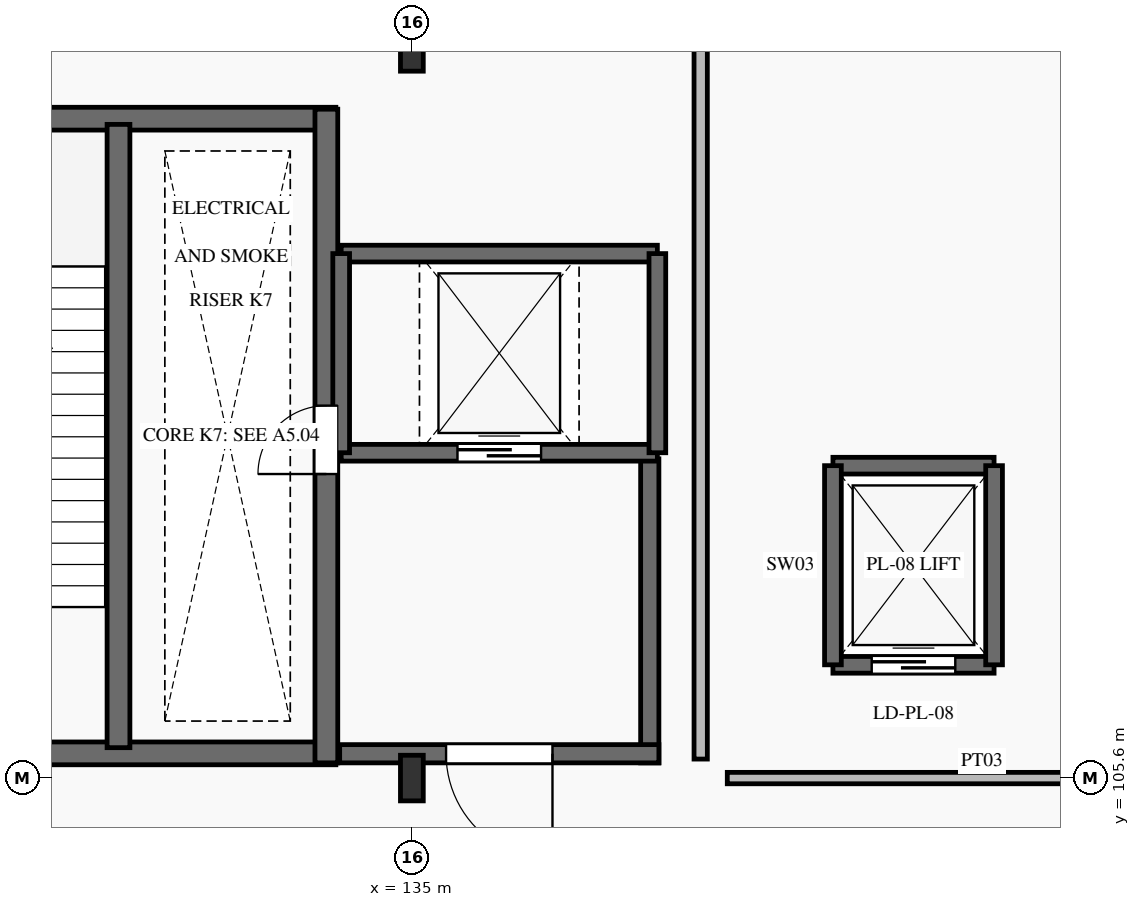
"""IFC4 building model, lengths in metres.
Left out: names, types, materials, properties, quantities, classifications, styles, units other than length and angle.
Written with IfcOpenShell. Run it as: python <this file> out.ifc"""

import sys

from ifc_helpers import new_model, si_unit, direction, frame, frame_2d, origin, origin_2d, place, context, subcontext, project, spatial, rectangle, i_section, extrude, element, fill, save


model = new_model("IFC4")
c1 = context("Model", 3, precision=1e-05, world=origin(), true_north=direction((0.0, 1.0)))
c2 = subcontext(c1, "Body", "Model", "MODEL_VIEW")
j1 = project(units=[si_unit("LENGTHUNIT", "METRE"), si_unit("PLANEANGLEUNIT", "RADIAN")], contexts=[c1])
p1 = place(None, origin())
s1 = spatial("IfcSite", under=j1, at=p1, CompositionType="ELEMENT")
p2 = place(p1, origin())
s2 = spatial("IfcBuilding", under=s1, at=p2, CompositionType="ELEMENT")
p3 = place(p2, origin())
s3 = spatial("IfcBuildingStorey", under=s2, at=p3, CompositionType="ELEMENT", Elevation=0.0)
for number, where, z_axis, x_axis in (
    (1, (135.0, 105.6, 0.0), (0.0, 0.0, 1.0), (1.0, 0.0, 0.0)),
    (2, (135.0, 115.2, 0.0), (0.0, 0.0, 1.0), (1.0, 0.0, 0.0)),
):
    element("IfcColumn", number, at=place(p3, frame(where, z_axis=z_axis, x_axis=x_axis)), inside=s3, PredefinedType="COLUMN", context=c2, shape_type="SweptSolid", body=[
        extrude(i_section(OverallWidth=0.3, OverallDepth=0.6, WebThickness=0.015, FlangeThickness=0.03, FilletRadius=0.027, at=origin_2d()), origin(), (0.0, 0.0, 1.0), 6.0),
    ])
p4 = place(p3, frame((127.0, 105.925, 0.0), z_axis=(0.0, 0.0, 1.0), x_axis=(1.0, 0.0, 0.0)))
e3 = element("IfcWall", 3, at=p4, inside=s3, PredefinedType="SHEAR", context=c2, shape_type="SweptSolid", body=[
    extrude(rectangle(XDim=7.0, YDim=0.3, at=frame_2d((3.5, 0.0))), origin(), (0.0, 0.0, 1.0), 6.0),
])
p5 = place(p4, frame((1.25, 0.0, 0.0)))
e4 = element("IfcOpeningElement", 4, at=p5, cuts=e3, PredefinedType="OPENING", context=c2, shape_type="SweptSolid", body=[
    extrude(rectangle(XDim=1.35, YDim=2.2, at=frame_2d((0.675, 1.1))), frame((0.0, 0.165, 0.0), z_axis=(0.0, -1.0, 0.0), x_axis=(1.0, 0.0, 0.0)), (0.0, 0.0, 1.0), 0.33),
])
p6 = place(p3, frame((127.0, 114.275, 0.0), z_axis=(0.0, 0.0, 1.0), x_axis=(1.0, 0.0, 0.0)))
e5 = element("IfcWall", 5, at=p6, inside=s3, PredefinedType="SHEAR", context=c2, shape_type="SweptSolid", body=[
    extrude(rectangle(XDim=7.0, YDim=0.3, at=frame_2d((3.5, 0.0))), origin(), (0.0, 0.0, 1.0), 6.0),
])
p7 = place(p3, frame((133.875, 105.8, 0.0), z_axis=(0.0, 0.0, 1.0), x_axis=(0.0, 1.0, 0.0)))
e6 = element("IfcWall", 6, at=p7, inside=s3, PredefinedType="SHEAR", context=c2, shape_type="SweptSolid", body=[
    extrude(rectangle(XDim=8.6, YDim=0.3, at=frame_2d((4.3, 0.0))), origin(), (0.0, 0.0, 1.0), 6.0),
])
p8 = place(p7, frame((3.8, 0.0, 0.0)))
e7 = element("IfcOpeningElement", 7, at=p8, cuts=e6, PredefinedType="OPENING", context=c2, shape_type="SweptSolid", body=[
    extrude(rectangle(XDim=0.9, YDim=2.05, at=frame_2d((0.45, 1.025))), frame((0.0, 0.165, 0.0), z_axis=(0.0, -1.0, 0.0), x_axis=(1.0, 0.0, 0.0)), (0.0, 0.0, 1.0), 0.33),
])
p9 = place(p3, frame((131.14, 106.0, 0.0), z_axis=(0.0, 0.0, 1.0), x_axis=(0.0, 1.0, 0.0)))
e8 = element("IfcWall", 8, at=p9, inside=s3, PredefinedType="SHEAR", context=c2, shape_type="SweptSolid", body=[
    extrude(rectangle(XDim=8.2, YDim=0.3, at=frame_2d((4.1, 0.0))), origin(), (0.0, 0.0, 1.0), 6.0),
])
p10 = place(p3, frame((138.13, 105.8, 0.0), z_axis=(0.0, 0.0, 1.0), x_axis=(0.0, 1.0, 0.0)))
e9 = element("IfcWall", 9, at=p10, inside=s3, PredefinedType="SHEAR", context=c2, shape_type="SweptSolid", body=[
    extrude(rectangle(XDim=4.0, YDim=0.24, at=frame_2d((2.0, 0.0))), origin(), (0.0, 0.0, 1.0), 6.0),
])
p11 = place(p3, frame((134.05, 105.92, 0.0), z_axis=(0.0, 0.0, 1.0), x_axis=(1.0, 0.0, 0.0)))
e10 = element("IfcWall", 10, at=p11, inside=s3, PredefinedType="SHEAR", context=c2, shape_type="SweptSolid", body=[
    extrude(rectangle(XDim=4.2, YDim=0.24, at=frame_2d((2.1, 0.0))), origin(), (0.0, 0.0, 1.0), 6.0),
])
p12 = place(p11, frame((1.4, 0.0, 0.0)))
e11 = element("IfcOpeningElement", 11, at=p12, cuts=e10, PredefinedType="OPENING", context=c2, shape_type="SweptSolid", body=[
    extrude(rectangle(XDim=1.4, YDim=2.2, at=frame_2d((0.7, 1.1))), frame((0.0, 0.135, 0.0), z_axis=(0.0, -1.0, 0.0), x_axis=(1.0, 0.0, 0.0)), (0.0, 0.0, 1.0), 0.27),
])
p13 = place(p3, frame((140.54, 107.09, 0.0), z_axis=(0.0, 0.0, 1.0), x_axis=(1.0, 0.0, 0.0)))
e12 = element("IfcWall", 12, at=p13, inside=s3, PredefinedType="SHEAR", context=c2, shape_type="SweptSolid", body=[
    extrude(rectangle(XDim=2.12, YDim=0.22, at=frame_2d((1.06, 0.0))), origin(), (0.0, 0.0, 1.0), 6.0),
])
p14 = place(p13, frame((0.51, 0.0, 0.0)))
e13 = element("IfcOpeningElement", 13, at=p14, cuts=e12, PredefinedType="OPENING", context=c2, shape_type="SweptSolid", body=[
    extrude(rectangle(XDim=1.1, YDim=2.15, at=frame_2d((0.55, 1.075))), frame((0.0, 0.125, 0.0), z_axis=(0.0, -1.0, 0.0), x_axis=(1.0, 0.0, 0.0)), (0.0, 0.0, 1.0), 0.25),
])
p15 = place(p3, frame((140.54, 109.71, 0.0), z_axis=(0.0, 0.0, 1.0), x_axis=(1.0, 0.0, 0.0)))
e14 = element("IfcWall", 14, at=p15, inside=s3, PredefinedType="SHEAR", context=c2, shape_type="SweptSolid", body=[
    extrude(rectangle(XDim=2.12, YDim=0.22, at=frame_2d((1.06, 0.0))), origin(), (0.0, 0.0, 1.0), 6.0),
])
for number, where, z_axis, x_axis in (
    (15, (140.54, 107.09, 0.0), (0.0, 0.0, 1.0), (0.0, 1.0, 0.0)),
    (16, (142.66, 107.09, 0.0), (0.0, 0.0, 1.0), (0.0, 1.0, 0.0)),
):
    element("IfcWall", number, at=place(p3, frame(where, z_axis=z_axis, x_axis=x_axis)), inside=s3, PredefinedType="SHEAR", context=c2, shape_type="SweptSolid", body=[
        extrude(rectangle(XDim=2.62, YDim=0.22, at=frame_2d((1.31, 0.0))), origin(), (0.0, 0.0, 1.0), 6.0),
    ])
p16 = place(p3, frame((134.07, 109.88, 0.0), z_axis=(0.0, 0.0, 1.0), x_axis=(1.0, 0.0, 0.0)))
e17 = element("IfcWall", 17, at=p16, inside=s3, PredefinedType="SHEAR", context=c2, shape_type="SweptSolid", body=[
    extrude(rectangle(XDim=4.16, YDim=0.22, at=frame_2d((2.08, 0.0))), origin(), (0.0, 0.0, 1.0), 6.0),
])
p17 = place(p16, frame((1.53, 0.0, 0.0)))
e18 = element("IfcOpeningElement", 18, at=p17, cuts=e17, PredefinedType="OPENING", context=c2, shape_type="SweptSolid", body=[
    extrude(rectangle(XDim=1.1, YDim=2.15, at=frame_2d((0.55, 1.075))), frame((0.0, 0.125, 0.0), z_axis=(0.0, -1.0, 0.0), x_axis=(1.0, 0.0, 0.0)), (0.0, 0.0, 1.0), 0.25),
])
p18 = place(p3, frame((134.07, 112.5, 0.0), z_axis=(0.0, 0.0, 1.0), x_axis=(1.0, 0.0, 0.0)))
e19 = element("IfcWall", 19, at=p18, inside=s3, PredefinedType="SHEAR", context=c2, shape_type="SweptSolid", body=[
    extrude(rectangle(XDim=4.16, YDim=0.22, at=frame_2d((2.08, 0.0))), origin(), (0.0, 0.0, 1.0), 6.0),
])
for number, where, z_axis, x_axis in (
    (20, (134.07, 109.88, 0.0), (0.0, 0.0, 1.0), (0.0, 1.0, 0.0)),
    (21, (138.23, 109.88, 0.0), (0.0, 0.0, 1.0), (0.0, 1.0, 0.0)),
):
    element("IfcWall", number, at=place(p3, frame(where, z_axis=z_axis, x_axis=x_axis)), inside=s3, PredefinedType="SHEAR", context=c2, shape_type="SweptSolid", body=[
        extrude(rectangle(XDim=2.62, YDim=0.22, at=frame_2d((1.31, 0.0))), origin(), (0.0, 0.0, 1.0), 6.0),
    ])
p19 = place(p3, frame((139.15, 105.6, 0.0), z_axis=(0.0, 0.0, 1.0), x_axis=(1.0, 0.0, 0.0)))
e22 = element("IfcWall", 22, at=p19, inside=s3, PredefinedType="PARTITIONING", context=c2, shape_type="SweptSolid", body=[
    extrude(rectangle(XDim=14.3, YDim=0.15, at=frame_2d((7.15, 0.0))), origin(), (0.0, 0.0, 1.0), 5.37),
])
p20 = place(p19, frame((7.05, 0.0, 0.0)))
e23 = element("IfcOpeningElement", 23, at=p20, cuts=e22, PredefinedType="OPENING", context=c2, shape_type="SweptSolid", body=[
    extrude(rectangle(XDim=1.6, YDim=2.25, at=frame_2d((0.8, 1.125))), frame((0.0, 0.09, 0.0), z_axis=(0.0, -1.0, 0.0), x_axis=(1.0, 0.0, 0.0)), (0.0, 0.0, 1.0), 0.18),
])
p21 = place(p3, frame((138.8, 105.85, 0.0), z_axis=(0.0, 0.0, 1.0), x_axis=(0.0, 1.0, 0.0)))
e24 = element("IfcWall", 24, at=p21, inside=s3, PredefinedType="PARTITIONING", context=c2, shape_type="SweptSolid", body=[
    extrude(rectangle(XDim=18.1, YDim=0.175, at=frame_2d((9.05, 0.0))), origin(), (0.0, 0.0, 1.0), 5.72),
])
p22 = place(p8, origin())
e25 = element("IfcDoor", 25, at=p22, inside=s3, OperationType="SINGLE_SWING_LEFT", PredefinedType="DOOR", context=c2, shape_type="SweptSolid", body=[
    extrude(rectangle(XDim=0.9, YDim=2.05, at=frame_2d((0.45, 1.025))), frame((0.0, 0.025, 0.0), z_axis=(0.0, -1.0, 0.0), x_axis=(1.0, 0.0, 0.0)), (0.0, 0.0, 1.0), 0.05),
])
fill(e7, e25)
p23 = place(p12, frame((1.4, 0.0, 0.0), z_axis=(0.0, 0.0, 1.0), x_axis=(-1.0, 0.0, 0.0)))
e26 = element("IfcDoor", 26, at=p23, inside=s3, OperationType="SINGLE_SWING_RIGHT", PredefinedType="DOOR", context=c2, shape_type="SweptSolid", body=[
    extrude(rectangle(XDim=1.4, YDim=2.2, at=frame_2d((0.7, 1.1))), frame((0.0, 0.025, 0.0), z_axis=(0.0, -1.0, 0.0), x_axis=(1.0, 0.0, 0.0)), (0.0, 0.0, 1.0), 0.05),
])
fill(e11, e26)
p24 = place(p14, origin())
e27 = element("IfcDoor", 27, at=p24, inside=s3, OperationType="SLIDING_TO_LEFT", PredefinedType="DOOR", context=c2, shape_type="SweptSolid", body=[
    extrude(rectangle(XDim=1.1, YDim=2.15, at=frame_2d((0.55, 1.075))), frame((0.0, 0.025, 0.0), z_axis=(0.0, -1.0, 0.0), x_axis=(1.0, 0.0, 0.0)), (0.0, 0.0, 1.0), 0.05),
])
fill(e13, e27)
p25 = place(p17, origin())
e28 = element("IfcDoor", 28, at=p25, inside=s3, OperationType="SLIDING_TO_LEFT", PredefinedType="DOOR", context=c2, shape_type="SweptSolid", body=[
    extrude(rectangle(XDim=1.1, YDim=2.15, at=frame_2d((0.55, 1.075))), frame((0.0, 0.025, 0.0), z_axis=(0.0, -1.0, 0.0), x_axis=(1.0, 0.0, 0.0)), (0.0, 0.0, 1.0), 0.05),
])
fill(e18, e28)
save(model, sys.argv[1])
